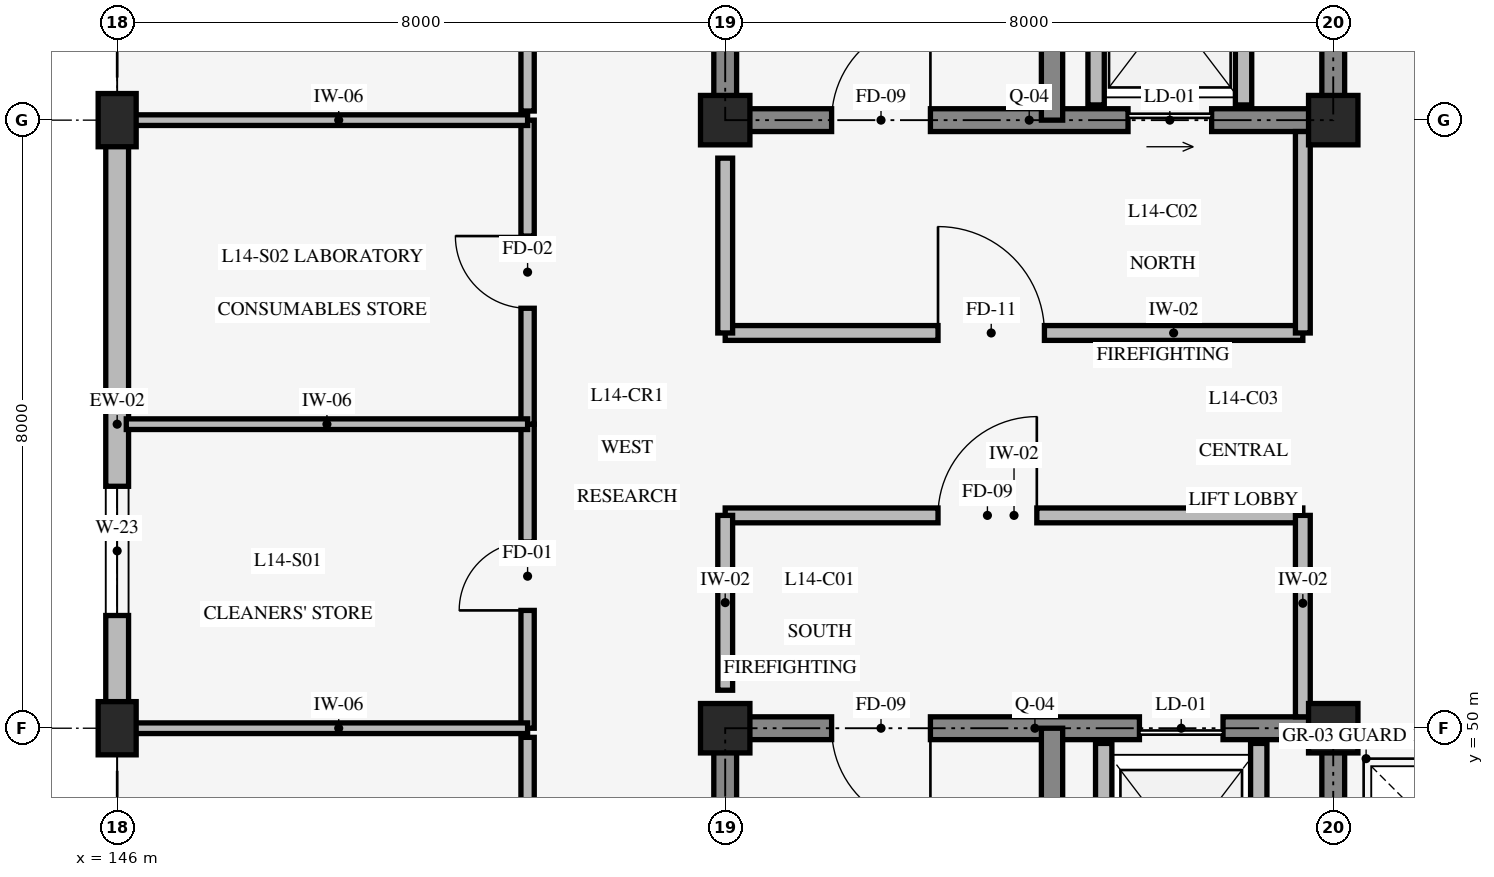
"""IFC4 building model, lengths in metres.
Left out: names, types, materials, properties, quantities, classifications, styles, units other than length and angle.
Written with IfcOpenShell. Run it as: python <this file> out.ifc"""

import sys

from ifc_helpers import new_model, si_unit, direction, frame, frame_2d, origin, origin_2d, place, context, subcontext, project, spatial, rectangle, extrude, element, fill, save


model = new_model("IFC4")
c1 = context("Model", 3, precision=1e-05, world=origin(), true_north=direction((0.0, 1.0)))
c2 = subcontext(c1, "Body", "Model", "MODEL_VIEW")
j1 = project(units=[si_unit("LENGTHUNIT", "METRE"), si_unit("PLANEANGLEUNIT", "RADIAN")], contexts=[c1])
p1 = place(None, origin())
s1 = spatial("IfcSite", under=j1, at=p1, CompositionType="ELEMENT")
p2 = place(p1, origin())
s2 = spatial("IfcBuilding", under=s1, at=p2, CompositionType="ELEMENT")
p3 = place(p2, frame((0.0, 0.0, 57.0)))
s3 = spatial("IfcBuildingStorey", under=s2, at=p3, CompositionType="ELEMENT", Elevation=57.0)
p4 = place(p3, frame((162.0, 42.0, 0.0), z_axis=(0.0, 0.0, 1.0), x_axis=(0.0, 1.0, 0.0)))
e1 = element("IfcWall", 1, at=p4, inside=s3, PredefinedType="SHEAR", context=c2, shape_type="SweptSolid", body=[
    extrude(rectangle(XDim=8.0, YDim=0.3, at=frame_2d((4.0, 0.0))), origin(), (0.0, 0.0, 1.0), 3.95),
])
p5 = place(p4, frame((3.175, 0.0, 0.0)))
e2 = element("IfcOpeningElement", 2, at=p5, cuts=e1, PredefinedType="OPENING", context=c2, shape_type="SweptSolid", body=[
    extrude(rectangle(XDim=1.05, YDim=2.2, at=frame_2d((0.525, 1.1))), frame((0.0, 0.16, 0.0), z_axis=(0.0, -1.0, 0.0), x_axis=(1.0, 0.0, 0.0)), (0.0, 0.0, 1.0), 0.32),
])
p6 = place(p3, frame((162.0, 50.0, 0.0), z_axis=(0.0, 0.0, 1.0), x_axis=(-1.0, 0.0, 0.0)))
e3 = element("IfcWall", 3, at=p6, inside=s3, PredefinedType="SHEAR", context=c2, shape_type="SweptSolid", body=[
    extrude(rectangle(XDim=8.0, YDim=0.3, at=frame_2d((4.0, 0.0))), origin(), (0.0, 0.0, 1.0), 3.95),
])
p7 = place(p6, frame((5.3, 0.0, 0.0)))
e4 = element("IfcOpeningElement", 4, at=p7, cuts=e3, PredefinedType="OPENING", context=c2, shape_type="SweptSolid", body=[
    extrude(rectangle(XDim=1.3, YDim=2.15, at=frame_2d((0.65, 1.075))), frame((0.0, 0.16, 0.0), z_axis=(0.0, -1.0, 0.0), x_axis=(1.0, 0.0, 0.0)), (0.0, 0.0, 1.0), 0.32),
])
p8 = place(p6, frame((1.45, 0.0, 0.0)))
e5 = element("IfcOpeningElement", 5, at=p8, cuts=e3, PredefinedType="OPENING", context=c2, shape_type="SweptSolid", body=[
    extrude(rectangle(XDim=1.1, YDim=2.2, at=frame_2d((0.55, 1.1))), frame((0.0, 0.16, 0.0), z_axis=(0.0, -1.0, 0.0), x_axis=(1.0, 0.0, 0.0)), (0.0, 0.0, 1.0), 0.32),
])
p9 = place(p3, frame((154.0, 50.0, 0.0), z_axis=(0.0, 0.0, 1.0), x_axis=(0.0, -1.0, 0.0)))
e6 = element("IfcWall", 6, at=p9, inside=s3, PredefinedType="SHEAR", context=c2, shape_type="SweptSolid", body=[
    extrude(rectangle(XDim=8.0, YDim=0.3, at=frame_2d((4.0, 0.0))), origin(), (0.0, 0.0, 1.0), 3.95),
])
p10 = place(p3, frame((158.3, 42.0, 0.0), z_axis=(0.0, 0.0, 1.0), x_axis=(0.0, 1.0, 0.0)))
e7 = element("IfcWall", 7, at=p10, inside=s3, PredefinedType="SHEAR", context=c2, shape_type="SweptSolid", body=[
    extrude(rectangle(XDim=8.0, YDim=0.28, at=frame_2d((4.0, 0.0))), origin(), (0.0, 0.0, 1.0), 3.95),
])
p11 = place(p3, frame((154.0, 58.0, 0.0), z_axis=(0.0, 0.0, 1.0), x_axis=(1.0, 0.0, 0.0)))
e8 = element("IfcWall", 8, at=p11, inside=s3, PredefinedType="SHEAR", context=c2, shape_type="SweptSolid", body=[
    extrude(rectangle(XDim=8.0, YDim=0.3, at=frame_2d((4.0, 0.0))), origin(), (0.0, 0.0, 1.0), 3.95),
])
p12 = place(p11, frame((1.4, 0.0, 0.0)))
e9 = element("IfcOpeningElement", 9, at=p12, cuts=e8, PredefinedType="OPENING", context=c2, shape_type="SweptSolid", body=[
    extrude(rectangle(XDim=1.3, YDim=2.15, at=frame_2d((0.65, 1.075))), frame((0.0, 0.16, 0.0), z_axis=(0.0, -1.0, 0.0), x_axis=(1.0, 0.0, 0.0)), (0.0, 0.0, 1.0), 0.32),
])
p13 = place(p11, frame((5.3, 0.0, 0.0)))
e10 = element("IfcOpeningElement", 10, at=p13, cuts=e8, PredefinedType="OPENING", context=c2, shape_type="SweptSolid", body=[
    extrude(rectangle(XDim=1.1, YDim=2.2, at=frame_2d((0.55, 1.1))), frame((0.0, 0.16, 0.0), z_axis=(0.0, -1.0, 0.0), x_axis=(1.0, 0.0, 0.0)), (0.0, 0.0, 1.0), 0.32),
])
p14 = place(p3, frame((162.0, 58.0, 0.0), z_axis=(0.0, 0.0, 1.0), x_axis=(0.0, 1.0, 0.0)))
e11 = element("IfcWall", 11, at=p14, inside=s3, PredefinedType="SHEAR", context=c2, shape_type="SweptSolid", body=[
    extrude(rectangle(XDim=8.0, YDim=0.3, at=frame_2d((4.0, 0.0))), origin(), (0.0, 0.0, 1.0), 3.95),
])
p15 = place(p14, frame((3.275, 0.0, 0.0)))
e12 = element("IfcOpeningElement", 12, at=p15, cuts=e11, PredefinedType="OPENING", context=c2, shape_type="SweptSolid", body=[
    extrude(rectangle(XDim=1.05, YDim=2.2, at=frame_2d((0.525, 1.1))), frame((0.0, 0.16, 0.0), z_axis=(0.0, -1.0, 0.0), x_axis=(1.0, 0.0, 0.0)), (0.0, 0.0, 1.0), 0.32),
])
p16 = place(p14, frame((5.45, 0.0, 0.0)))
e13 = element("IfcOpeningElement", 13, at=p16, cuts=e11, PredefinedType="OPENING", context=c2, shape_type="SweptSolid", body=[
    extrude(rectangle(XDim=1.4, YDim=2.3, at=frame_2d((0.7, 1.15))), frame((0.0, 0.16, 0.0), z_axis=(0.0, -1.0, 0.0), x_axis=(1.0, 0.0, 0.0)), (0.0, 0.0, 1.0), 0.32),
])
p17 = place(p3, frame((154.0, 66.0, 0.0), z_axis=(0.0, 0.0, 1.0), x_axis=(0.0, -1.0, 0.0)))
e14 = element("IfcWall", 14, at=p17, inside=s3, PredefinedType="SHEAR", context=c2, shape_type="SweptSolid", body=[
    extrude(rectangle(XDim=8.0, YDim=0.3, at=frame_2d((4.0, 0.0))), origin(), (0.0, 0.0, 1.0), 3.95),
])
p18 = place(p3, frame((158.3, 58.0, 0.0), z_axis=(0.0, 0.0, 1.0), x_axis=(0.0, 1.0, 0.0)))
e15 = element("IfcWall", 15, at=p18, inside=s3, PredefinedType="SHEAR", context=c2, shape_type="SweptSolid", body=[
    extrude(rectangle(XDim=8.0, YDim=0.28, at=frame_2d((4.0, 0.0))), origin(), (0.0, 0.0, 1.0), 3.95),
])
for number, where, z_axis, x_axis in (
    (16, (146.0, 50.0, 0.0), (0.0, 0.0, 1.0), (1.0, 0.0, 0.0)),
    (17, (146.0, 58.0, 0.0), (0.0, 0.0, 1.0), (1.0, 0.0, 0.0)),
):
    element("IfcColumn", number, at=place(p3, frame(where, z_axis=z_axis, x_axis=x_axis)), inside=s3, PredefinedType="COLUMN", context=c2, shape_type="SweptSolid", body=[
        extrude(rectangle(XDim=0.5, YDim=0.7, at=origin_2d()), origin(), (0.0, 0.0, 1.0), 4.2),
    ])
for number, where, z_axis, x_axis in (
    (18, (154.0, 50.0, 0.0), (0.0, 0.0, 1.0), (1.0, 0.0, 0.0)),
    (19, (154.0, 58.0, 0.0), (0.0, 0.0, 1.0), (1.0, 0.0, 0.0)),
    (20, (162.0, 50.0, 0.0), (0.0, 0.0, 1.0), (1.0, 0.0, 0.0)),
    (21, (162.0, 58.0, 0.0), (0.0, 0.0, 1.0), (1.0, 0.0, 0.0)),
):
    element("IfcColumn", number, at=place(p3, frame(where, z_axis=z_axis, x_axis=x_axis)), inside=s3, PredefinedType="COLUMN", context=c2, shape_type="SweptSolid", body=[
        extrude(rectangle(XDim=0.65, YDim=0.65, at=origin_2d()), origin(), (0.0, 0.0, 1.0), 4.2),
    ])
p19 = place(p3, frame((146.0, 50.0, 0.0), z_axis=(0.0, 0.0, 1.0), x_axis=(0.0, 1.0, 0.0)))
e22 = element("IfcWall", 22, at=p19, inside=s3, PredefinedType="STANDARD", context=c2, shape_type="SweptSolid", body=[
    extrude(rectangle(XDim=8.0, YDim=0.3, at=frame_2d((4.0, 0.0))), origin(), (0.0, 0.0, 1.0), 3.34),
])
p20 = place(p19, frame((1.483, 0.0, 0.85)))
e23 = element("IfcOpeningElement", 23, at=p20, cuts=e22, PredefinedType="OPENING", context=c2, shape_type="SweptSolid", body=[
    extrude(rectangle(XDim=1.7, YDim=1.2, at=frame_2d((0.85, 0.6))), frame((0.0, 0.16, 0.0), z_axis=(0.0, -1.0, 0.0), x_axis=(1.0, 0.0, 0.0)), (0.0, 0.0, 1.0), 0.32),
])
for number, where, z_axis, x_axis in (
    (24, (158.98, 47.02, 0.0), (0.0, 0.0, 1.0), (0.0, 1.0, 0.0)),
    (25, (161.02, 47.02, 0.0), (0.0, 0.0, 1.0), (0.0, 1.0, 0.0)),
):
    element("IfcWall", number, at=place(p3, frame(where, z_axis=z_axis, x_axis=x_axis)), inside=s3, PredefinedType="STANDARD", context=c2, shape_type="SweptSolid", body=[
        extrude(rectangle(XDim=2.78, YDim=0.215, at=frame_2d((1.39, 0.0))), origin(), (0.0, 0.0, 1.0), 3.9),
    ])
for number, where, z_axis, x_axis in (
    (26, (160.82, 58.2, 0.0), (0.0, 0.0, 1.0), (0.0, 1.0, 0.0)),
    (27, (158.88, 58.2, 0.0), (0.0, 0.0, 1.0), (0.0, 1.0, 0.0)),
):
    element("IfcWall", number, at=place(p3, frame(where, z_axis=z_axis, x_axis=x_axis)), inside=s3, PredefinedType="STANDARD", context=c2, shape_type="SweptSolid", body=[
        extrude(rectangle(XDim=2.55, YDim=0.215, at=frame_2d((1.275, 0.0))), origin(), (0.0, 0.0, 1.0), 3.9),
    ])
p21 = place(p3, frame((154.0, 52.8, 0.0), z_axis=(0.0, 0.0, 1.0), x_axis=(1.0, 0.0, 0.0)))
e28 = element("IfcWall", 28, at=p21, inside=s3, PredefinedType="STANDARD", context=c2, shape_type="SweptSolid", body=[
    extrude(rectangle(XDim=7.6, YDim=0.195, at=frame_2d((3.8, 0.0))), origin(), (0.0, 0.0, 1.0), 3.9),
])
p22 = place(p21, frame((2.8, 0.0, 0.0)))
e29 = element("IfcOpeningElement", 29, at=p22, cuts=e28, PredefinedType="OPENING", context=c2, shape_type="SweptSolid", body=[
    extrude(rectangle(XDim=1.3, YDim=2.15, at=frame_2d((0.65, 1.075))), frame((0.0, 0.107, 0.0), z_axis=(0.0, -1.0, 0.0), x_axis=(1.0, 0.0, 0.0)), (0.0, 0.0, 1.0), 0.215),
])
p23 = place(p3, frame((161.6, 50.15, 0.0), z_axis=(0.0, 0.0, 1.0), x_axis=(0.0, 1.0, 0.0)))
e30 = element("IfcWall", 30, at=p23, inside=s3, PredefinedType="STANDARD", context=c2, shape_type="SweptSolid", body=[
    extrude(rectangle(XDim=2.65, YDim=0.195, at=frame_2d((1.325, 0.0))), origin(), (0.0, 0.0, 1.0), 3.34),
])
p24 = place(p3, frame((154.0, 50.5, 0.0), z_axis=(0.0, 0.0, 1.0), x_axis=(0.0, 1.0, 0.0)))
e31 = element("IfcWall", 31, at=p24, inside=s3, PredefinedType="STANDARD", context=c2, shape_type="SweptSolid", body=[
    extrude(rectangle(XDim=2.3, YDim=0.195, at=frame_2d((1.15, 0.0))), origin(), (0.0, 0.0, 1.0), 3.34),
])
p25 = place(p3, frame((154.0, 55.2, 0.0), z_axis=(0.0, 0.0, 1.0), x_axis=(1.0, 0.0, 0.0)))
e32 = element("IfcWall", 32, at=p25, inside=s3, PredefinedType="STANDARD", context=c2, shape_type="SweptSolid", body=[
    extrude(rectangle(XDim=7.6, YDim=0.195, at=frame_2d((3.8, 0.0))), origin(), (0.0, 0.0, 1.0), 3.9),
])
p26 = place(p25, frame((2.8, 0.0, 0.0)))
e33 = element("IfcOpeningElement", 33, at=p26, cuts=e32, PredefinedType="OPENING", context=c2, shape_type="SweptSolid", body=[
    extrude(rectangle(XDim=1.4, YDim=2.2, at=frame_2d((0.7, 1.1))), frame((0.0, 0.107, 0.0), z_axis=(0.0, -1.0, 0.0), x_axis=(1.0, 0.0, 0.0)), (0.0, 0.0, 1.0), 0.215),
])
p27 = place(p3, frame((161.6, 55.2, 0.0), z_axis=(0.0, 0.0, 1.0), x_axis=(0.0, 1.0, 0.0)))
e34 = element("IfcWall", 34, at=p27, inside=s3, PredefinedType="STANDARD", context=c2, shape_type="SweptSolid", body=[
    extrude(rectangle(XDim=2.65, YDim=0.195, at=frame_2d((1.325, 0.0))), origin(), (0.0, 0.0, 1.0), 3.34),
])
p28 = place(p3, frame((154.0, 55.2, 0.0), z_axis=(0.0, 0.0, 1.0), x_axis=(0.0, 1.0, 0.0)))
e35 = element("IfcWall", 35, at=p28, inside=s3, PredefinedType="STANDARD", context=c2, shape_type="SweptSolid", body=[
    extrude(rectangle(XDim=2.3, YDim=0.195, at=frame_2d((1.15, 0.0))), origin(), (0.0, 0.0, 1.0), 3.34),
])
p29 = place(p3, frame((151.4, 42.05, 0.0), z_axis=(0.0, 0.0, 1.0), x_axis=(0.0, 1.0, 0.0)))
e36 = element("IfcWall", 36, at=p29, inside=s3, PredefinedType="STANDARD", context=c2, shape_type="SweptSolid", body=[
    extrude(rectangle(XDim=7.83, YDim=0.175, at=frame_2d((3.915, 0.0))), origin(), (0.0, 0.0, 1.0), 3.9),
])
p30 = place(p29, frame((3.065, 0.0, 0.0)))
e37 = element("IfcOpeningElement", 37, at=p30, cuts=e36, PredefinedType="OPENING", context=c2, shape_type="SweptSolid", body=[
    extrude(rectangle(XDim=1.7, YDim=2.3, at=frame_2d((0.85, 1.15))), frame((0.0, 0.098, 0.0), z_axis=(0.0, -1.0, 0.0), x_axis=(1.0, 0.0, 0.0)), (0.0, 0.0, 1.0), 0.195),
])
p31 = place(p3, frame((151.4, 58.12, 0.0), z_axis=(0.0, 0.0, 1.0), x_axis=(0.0, 1.0, 0.0)))
e38 = element("IfcWall", 38, at=p31, inside=s3, PredefinedType="STANDARD", context=c2, shape_type="SweptSolid", body=[
    extrude(rectangle(XDim=7.83, YDim=0.175, at=frame_2d((3.915, 0.0))), origin(), (0.0, 0.0, 1.0), 3.9),
])
p32 = place(p31, frame((3.015, 0.0, 0.0)))
e39 = element("IfcOpeningElement", 39, at=p32, cuts=e38, PredefinedType="OPENING", context=c2, shape_type="SweptSolid", body=[
    extrude(rectangle(XDim=1.8, YDim=2.3, at=frame_2d((0.9, 1.15))), frame((0.0, 0.098, 0.0), z_axis=(0.0, -1.0, 0.0), x_axis=(1.0, 0.0, 0.0)), (0.0, 0.0, 1.0), 0.195),
])
p33 = place(p3, frame((151.4, 50.0, 0.0), z_axis=(0.0, 0.0, 1.0), x_axis=(0.0, 1.0, 0.0)))
e40 = element("IfcWall", 40, at=p33, inside=s3, PredefinedType="STANDARD", context=c2, shape_type="SweptSolid", body=[
    extrude(rectangle(XDim=4.0, YDim=0.175, at=frame_2d((2.0, 0.0))), origin(), (0.0, 0.0, 1.0), 3.9),
])
p34 = place(p33, frame((1.55, 0.0, 0.0)))
e41 = element("IfcOpeningElement", 41, at=p34, cuts=e40, PredefinedType="OPENING", context=c2, shape_type="SweptSolid", body=[
    extrude(rectangle(XDim=0.9, YDim=2.1, at=frame_2d((0.45, 1.05))), frame((0.0, 0.098, 0.0), z_axis=(0.0, -1.0, 0.0), x_axis=(1.0, 0.0, 0.0)), (0.0, 0.0, 1.0), 0.195),
])
p35 = place(p3, frame((151.4, 54.0, 0.0), z_axis=(0.0, 0.0, 1.0), x_axis=(0.0, 1.0, 0.0)))
e42 = element("IfcWall", 42, at=p35, inside=s3, PredefinedType="STANDARD", context=c2, shape_type="SweptSolid", body=[
    extrude(rectangle(XDim=4.0, YDim=0.175, at=frame_2d((2.0, 0.0))), origin(), (0.0, 0.0, 1.0), 3.9),
])
p36 = place(p35, frame((1.525, 0.0, 0.0)))
e43 = element("IfcOpeningElement", 43, at=p36, cuts=e42, PredefinedType="OPENING", context=c2, shape_type="SweptSolid", body=[
    extrude(rectangle(XDim=0.95, YDim=2.1, at=frame_2d((0.475, 1.05))), frame((0.0, 0.098, 0.0), z_axis=(0.0, -1.0, 0.0), x_axis=(1.0, 0.0, 0.0)), (0.0, 0.0, 1.0), 0.195),
])
p37 = place(p3, frame((146.12, 50.0, 0.0), z_axis=(0.0, 0.0, 1.0), x_axis=(1.0, 0.0, 0.0)))
e44 = element("IfcWall", 44, at=p37, inside=s3, PredefinedType="STANDARD", context=c2, shape_type="SweptSolid", body=[
    extrude(rectangle(XDim=5.28, YDim=0.14, at=frame_2d((2.64, 0.0))), origin(), (0.0, 0.0, 1.0), 3.29),
])
p38 = place(p3, frame((146.12, 54.0, 0.0), z_axis=(0.0, 0.0, 1.0), x_axis=(1.0, 0.0, 0.0)))
e45 = element("IfcWall", 45, at=p38, inside=s3, PredefinedType="STANDARD", context=c2, shape_type="SweptSolid", body=[
    extrude(rectangle(XDim=5.28, YDim=0.14, at=frame_2d((2.64, 0.0))), origin(), (0.0, 0.0, 1.0), 3.9),
])
p39 = place(p3, frame((146.12, 58.0, 0.0), z_axis=(0.0, 0.0, 1.0), x_axis=(1.0, 0.0, 0.0)))
e46 = element("IfcWall", 46, at=p39, inside=s3, PredefinedType="STANDARD", context=c2, shape_type="SweptSolid", body=[
    extrude(rectangle(XDim=5.28, YDim=0.14, at=frame_2d((2.64, 0.0))), origin(), (0.0, 0.0, 1.0), 3.29),
])
p40 = place(p20, origin())
e47 = element("IfcWindow", 47, at=p40, inside=s3, PartitioningType="SINGLE_PANEL", PredefinedType="WINDOW", context=c2, shape_type="SweptSolid", body=[
    extrude(rectangle(XDim=1.7, YDim=1.2, at=frame_2d((0.85, 0.6))), frame((0.0, 0.03, 0.0), z_axis=(0.0, -1.0, 0.0), x_axis=(1.0, 0.0, 0.0)), (0.0, 0.0, 1.0), 0.06),
])
fill(e23, e47)
p41 = place(p7, origin())
e48 = element("IfcDoor", 48, at=p41, inside=s3, OperationType="SINGLE_SWING_LEFT", PredefinedType="DOOR", context=c2, shape_type="SweptSolid", body=[
    extrude(rectangle(XDim=1.3, YDim=2.15, at=frame_2d((0.65, 1.075))), frame((0.0, 0.025, 0.0), z_axis=(0.0, -1.0, 0.0), x_axis=(1.0, 0.0, 0.0)), (0.0, 0.0, 1.0), 0.05),
])
fill(e4, e48)
p42 = place(p8, origin())
e49 = element("IfcDoor", 49, at=p42, inside=s3, OperationType="SLIDING_TO_LEFT", PredefinedType="DOOR", context=c2, shape_type="SweptSolid", body=[
    extrude(rectangle(XDim=1.1, YDim=2.2, at=frame_2d((0.55, 1.1))), frame((0.0, 0.025, 0.0), z_axis=(0.0, -1.0, 0.0), x_axis=(1.0, 0.0, 0.0)), (0.0, 0.0, 1.0), 0.05),
])
fill(e5, e49)
p43 = place(p12, origin())
e50 = element("IfcDoor", 50, at=p43, inside=s3, OperationType="SINGLE_SWING_RIGHT", PredefinedType="DOOR", context=c2, shape_type="SweptSolid", body=[
    extrude(rectangle(XDim=1.3, YDim=2.15, at=frame_2d((0.65, 1.075))), frame((0.0, 0.025, 0.0), z_axis=(0.0, -1.0, 0.0), x_axis=(1.0, 0.0, 0.0)), (0.0, 0.0, 1.0), 0.05),
])
fill(e9, e50)
p44 = place(p13, origin())
e51 = element("IfcDoor", 51, at=p44, inside=s3, OperationType="SLIDING_TO_RIGHT", PredefinedType="DOOR", context=c2, shape_type="SweptSolid", body=[
    extrude(rectangle(XDim=1.1, YDim=2.2, at=frame_2d((0.55, 1.1))), frame((0.0, 0.025, 0.0), z_axis=(0.0, -1.0, 0.0), x_axis=(1.0, 0.0, 0.0)), (0.0, 0.0, 1.0), 0.05),
])
fill(e10, e51)
p45 = place(p22, origin())
e52 = element("IfcDoor", 52, at=p45, inside=s3, OperationType="SINGLE_SWING_RIGHT", PredefinedType="DOOR", context=c2, shape_type="SweptSolid", body=[
    extrude(rectangle(XDim=1.3, YDim=2.15, at=frame_2d((0.65, 1.075))), frame((0.0, 0.025, 0.0), z_axis=(0.0, -1.0, 0.0), x_axis=(1.0, 0.0, 0.0)), (0.0, 0.0, 1.0), 0.05),
])
fill(e29, e52)
p46 = place(p26, origin())
e53 = element("IfcDoor", 53, at=p46, inside=s3, OperationType="SINGLE_SWING_LEFT", PredefinedType="DOOR", context=c2, shape_type="SweptSolid", body=[
    extrude(rectangle(XDim=1.4, YDim=2.2, at=frame_2d((0.7, 1.1))), frame((0.0, 0.025, 0.0), z_axis=(0.0, -1.0, 0.0), x_axis=(1.0, 0.0, 0.0)), (0.0, 0.0, 1.0), 0.05),
])
fill(e33, e53)
p47 = place(p34, origin())
e54 = element("IfcDoor", 54, at=p47, inside=s3, OperationType="SINGLE_SWING_LEFT", PredefinedType="DOOR", context=c2, shape_type="SweptSolid", body=[
    extrude(rectangle(XDim=0.9, YDim=2.1, at=frame_2d((0.45, 1.05))), frame((0.0, 0.025, 0.0), z_axis=(0.0, -1.0, 0.0), x_axis=(1.0, 0.0, 0.0)), (0.0, 0.0, 1.0), 0.05),
])
fill(e41, e54)
p48 = place(p36, origin())
e55 = element("IfcDoor", 55, at=p48, inside=s3, OperationType="SINGLE_SWING_RIGHT", PredefinedType="DOOR", context=c2, shape_type="SweptSolid", body=[
    extrude(rectangle(XDim=0.95, YDim=2.1, at=frame_2d((0.475, 1.05))), frame((0.0, 0.025, 0.0), z_axis=(0.0, -1.0, 0.0), x_axis=(1.0, 0.0, 0.0)), (0.0, 0.0, 1.0), 0.05),
])
fill(e43, e55)
save(model, sys.argv[1])
